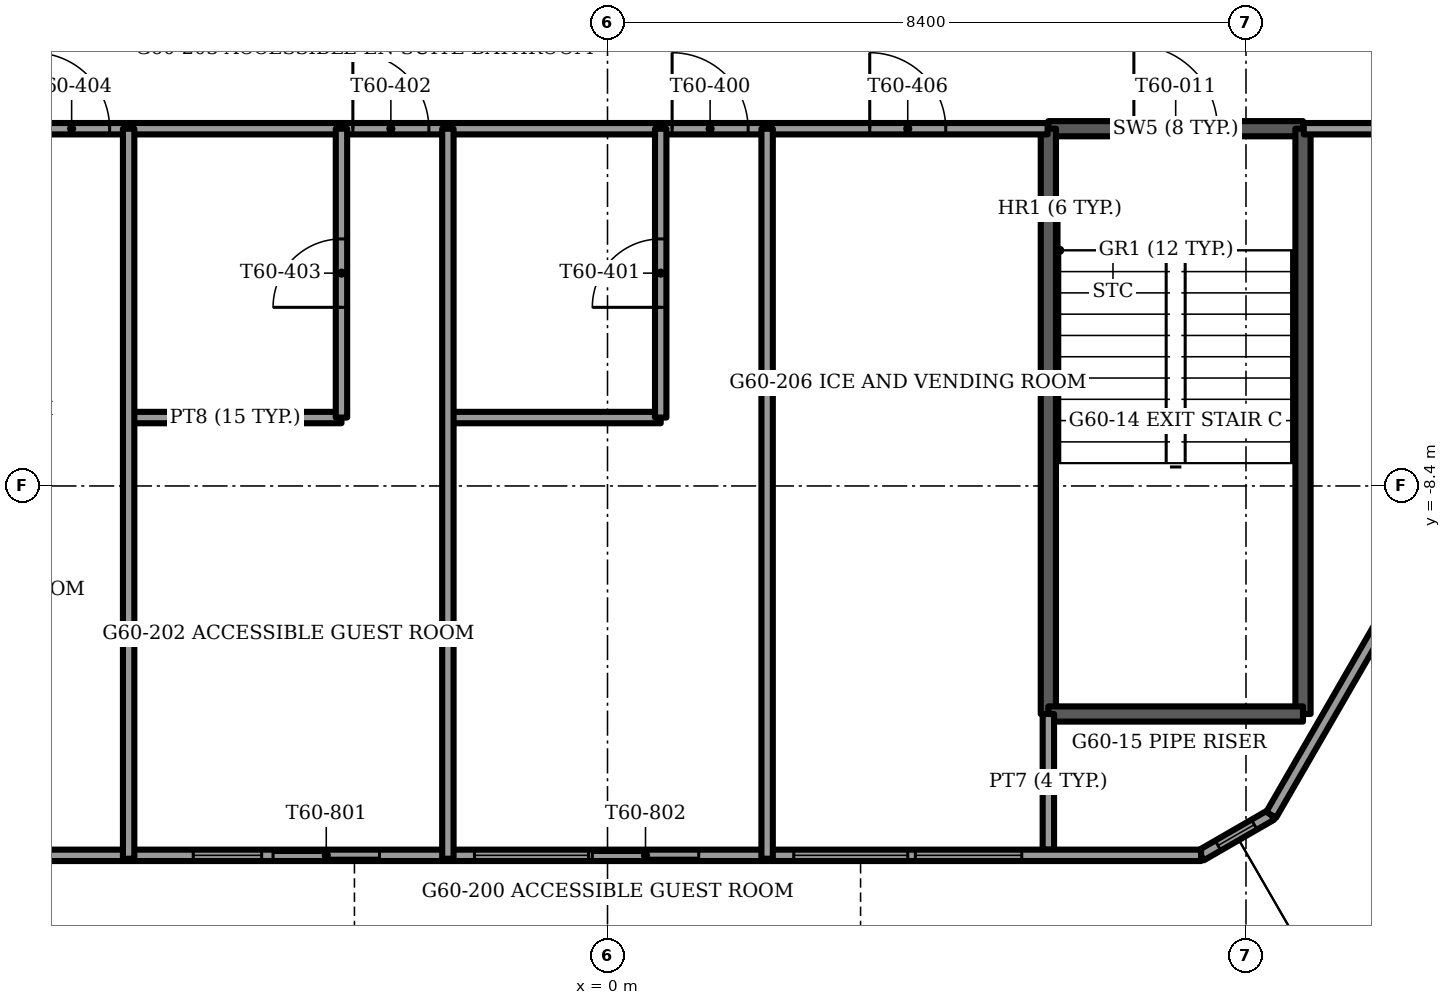
"""IFC4 building model, lengths in metres.
Left out: names, types, materials, properties, quantities, classifications, styles, units other than length and angle.
Written with IfcOpenShell. Run it as: python <this file> out.ifc"""

import sys

from ifc_helpers import new_model, si_unit, direction, frame, frame_2d, origin, place, context, subcontext, project, spatial, rectangle, extrude, element, fill, save


model = new_model("IFC4")
c1 = context("Model", 3, precision=1e-05, world=origin(), true_north=direction((0.0, 1.0)))
c2 = subcontext(c1, "Body", "Model", "MODEL_VIEW")
j1 = project(units=[si_unit("LENGTHUNIT", "METRE"), si_unit("PLANEANGLEUNIT", "RADIAN")], contexts=[c1])
p1 = place(None, origin())
s1 = spatial("IfcSite", under=j1, at=p1, CompositionType="ELEMENT")
p2 = place(p1, origin())
s2 = spatial("IfcBuilding", under=s1, at=p2, CompositionType="ELEMENT")
p3 = place(p2, frame((0.0, 0.0, 245.0)))
s3 = spatial("IfcBuildingStorey", under=s2, at=p3, CompositionType="ELEMENT", Elevation=245.0)
p4 = place(p3, frame((10.356, -15.762, 0.0), z_axis=(0.0, 0.0, 1.0), x_axis=(0.500002852929, 0.866023756639, 0.0)))
e1 = element("IfcWall", 1, at=p4, inside=s3, PredefinedType="PARAPET", context=c2, shape_type="SweptSolid", body=[
    extrude(rectangle(XDim=4.723, YDim=0.9, at=frame_2d((2.362, 0.0))), origin(), (0.0, 0.0, 1.0), 1.1),
])
p5 = place(p3, frame((-7.809, -13.26, 0.0), z_axis=(0.0, 0.0, 1.0), x_axis=(1.0, 0.0, 0.0)))
e2 = element("IfcWall", 2, at=p5, inside=s3, PredefinedType="SOLIDWALL", context=c2, shape_type="SweptSolid", body=[
    extrude(rectangle(XDim=15.618, YDim=0.15, at=frame_2d((7.809, 0.0))), origin(), (0.0, 0.0, 1.0), 3.45),
])
p6 = place(p5, frame((2.359, 0.0, 0.15)))
e3 = element("IfcOpeningElement", 3, at=p6, cuts=e2, PredefinedType="OPENING", context=c2, shape_type="SweptSolid", body=[
    extrude(rectangle(XDim=0.9, YDim=2.85, at=frame_2d((0.45, 1.425))), frame((0.0, 0.075, 0.0), z_axis=(0.0, -1.0, 0.0), x_axis=(1.0, 0.0, 0.0)), (0.0, 0.0, 1.0), 0.15),
])
p7 = place(p5, frame((3.409, 0.0, 0.0)))
e4 = element("IfcOpeningElement", 4, at=p7, cuts=e2, PredefinedType="OPENING", context=c2, shape_type="SweptSolid", body=[
    extrude(rectangle(XDim=1.4, YDim=2.4, at=frame_2d((0.7, 1.2))), frame((0.0, 0.075, 0.0), z_axis=(0.0, -1.0, 0.0), x_axis=(1.0, 0.0, 0.0)), (0.0, 0.0, 1.0), 0.15),
])
p8 = place(p5, frame((6.059, 0.0, 0.15)))
e5 = element("IfcOpeningElement", 5, at=p8, cuts=e2, PredefinedType="OPENING", context=c2, shape_type="SweptSolid", body=[
    extrude(rectangle(XDim=1.5, YDim=2.85, at=frame_2d((0.75, 1.425))), frame((0.0, 0.075, 0.0), z_axis=(0.0, -1.0, 0.0), x_axis=(1.0, 0.0, 0.0)), (0.0, 0.0, 1.0), 0.15),
])
p9 = place(p5, frame((7.609, 0.0, 0.0)))
e6 = element("IfcOpeningElement", 6, at=p9, cuts=e2, PredefinedType="OPENING", context=c2, shape_type="SweptSolid", body=[
    extrude(rectangle(XDim=1.4, YDim=2.4, at=frame_2d((0.7, 1.2))), frame((0.0, 0.075, 0.0), z_axis=(0.0, -1.0, 0.0), x_axis=(1.0, 0.0, 0.0)), (0.0, 0.0, 1.0), 0.15),
])
p10 = place(p5, frame((10.259, 0.0, 0.15)))
e7 = element("IfcOpeningElement", 7, at=p10, cuts=e2, PredefinedType="OPENING", context=c2, shape_type="SweptSolid", body=[
    extrude(rectangle(XDim=1.5, YDim=2.85, at=frame_2d((0.75, 1.425))), frame((0.0, 0.075, 0.0), z_axis=(0.0, -1.0, 0.0), x_axis=(1.0, 0.0, 0.0)), (0.0, 0.0, 1.0), 0.15),
])
p11 = place(p5, frame((11.859, 0.0, 0.15)))
e8 = element("IfcOpeningElement", 8, at=p11, cuts=e2, PredefinedType="OPENING", context=c2, shape_type="SweptSolid", body=[
    extrude(rectangle(XDim=1.4, YDim=2.85, at=frame_2d((0.7, 1.425))), frame((0.0, 0.075, 0.0), z_axis=(0.0, -1.0, 0.0), x_axis=(1.0, 0.0, 0.0)), (0.0, 0.0, 1.0), 0.15),
])
p12 = place(p3, frame((8.731, -12.727, 0.0), z_axis=(0.0, 0.0, 1.0), x_axis=(0.499997087355, 0.866027085394, 0.0)))
e9 = element("IfcWall", 9, at=p12, inside=s3, PredefinedType="SOLIDWALL", context=c2, shape_type="SweptSolid", body=[
    extrude(rectangle(XDim=13.312, YDim=0.15, at=frame_2d((6.656, 0.0))), origin(), (0.0, 0.0, 1.0), 3.45),
])
p13 = place(p12, frame((2.756, 0.0, 0.15)))
e10 = element("IfcOpeningElement", 10, at=p13, cuts=e9, PredefinedType="OPENING", context=c2, shape_type="SweptSolid", body=[
    extrude(rectangle(XDim=1.5, YDim=2.85, at=frame_2d((0.75, 1.425))), frame((0.0, 0.075, 0.0), z_axis=(0.0, -1.0, 0.0), x_axis=(1.0, 0.0, 0.0)), (0.0, 0.0, 1.0), 0.15),
])
p14 = place(p12, frame((4.956, 0.0, 0.0)))
e11 = element("IfcOpeningElement", 11, at=p14, cuts=e9, PredefinedType="OPENING", context=c2, shape_type="SweptSolid", body=[
    extrude(rectangle(XDim=1.4, YDim=2.4, at=frame_2d((0.7, 1.2))), frame((0.0, 0.075, 0.0), z_axis=(0.0, -1.0, 0.0), x_axis=(1.0, 0.0, 0.0)), (0.0, 0.0, 1.0), 0.15),
])
p15 = place(p12, frame((6.956, 0.0, 0.15)))
e12 = element("IfcOpeningElement", 12, at=p15, cuts=e9, PredefinedType="OPENING", context=c2, shape_type="SweptSolid", body=[
    extrude(rectangle(XDim=0.9, YDim=2.85, at=frame_2d((0.45, 1.425))), frame((0.0, 0.075, 0.0), z_axis=(0.0, -1.0, 0.0), x_axis=(1.0, 0.0, 0.0)), (0.0, 0.0, 1.0), 0.15),
])
p16 = place(p12, frame((8.149, 0.0, 0.0)))
e13 = element("IfcOpeningElement", 13, at=p16, cuts=e9, PredefinedType="OPENING", context=c2, shape_type="SweptSolid", body=[
    extrude(rectangle(XDim=1.4, YDim=2.4, at=frame_2d((0.7, 1.2))), frame((0.0, 0.075, 0.0), z_axis=(0.0, -1.0, 0.0), x_axis=(1.0, 0.0, 0.0)), (0.0, 0.0, 1.0), 0.15),
])
p17 = place(p12, frame((11.385, 0.0, 0.15)))
e14 = element("IfcOpeningElement", 14, at=p17, cuts=e9, PredefinedType="OPENING", context=c2, shape_type="SweptSolid", body=[
    extrude(rectangle(XDim=1.5, YDim=2.73, at=frame_2d((0.75, 1.365))), frame((0.0, 0.075, 0.0), z_axis=(0.0, -1.0, 0.0), x_axis=(1.0, 0.0, 0.0)), (0.0, 0.0, 1.0), 0.15),
])
p18 = place(p3, frame((7.809, -13.26, 0.0), z_axis=(0.0, 0.0, 1.0), x_axis=(0.865990848561, 0.500059846627, 0.0)))
e15 = element("IfcWall", 15, at=p18, inside=s3, PredefinedType="SOLIDWALL", context=c2, shape_type="SweptSolid", body=[
    extrude(rectangle(XDim=1.065, YDim=0.15, at=frame_2d((0.532, 0.0))), origin(), (0.0, 0.0, 1.0), 3.45),
])
p19 = place(p18, frame((0.258, 0.0, 0.15)))
e16 = element("IfcOpeningElement", 16, at=p19, cuts=e15, PredefinedType="OPENING", context=c2, shape_type="SweptSolid", body=[
    extrude(rectangle(XDim=0.55, YDim=2.85, at=frame_2d((0.275, 1.425))), frame((0.0, 0.075, 0.0), z_axis=(0.0, -1.0, 0.0), x_axis=(1.0, 0.0, 0.0)), (0.0, 0.0, 1.0), 0.15),
])
p20 = place(p3, frame((5.8, -3.7, -0.3), z_axis=(0.0, 0.0, 1.0), x_axis=(1.0, 0.0, 0.0)))
e17 = element("IfcWall", 17, at=p20, inside=s3, PredefinedType="SOLIDWALL", context=c2, shape_type="SweptSolid", body=[
    extrude(rectangle(XDim=3.35, YDim=0.2, at=frame_2d((1.675, 0.0))), origin(), (0.0, 0.0, 1.0), 3.75),
])
p21 = place(p20, frame((1.125, 0.0, 0.0)))
e18 = element("IfcOpeningElement", 18, at=p21, cuts=e17, PredefinedType="OPENING", context=c2, shape_type="SweptSolid", body=[
    extrude(rectangle(XDim=1.1, YDim=2.1, at=frame_2d((0.55, 1.05))), frame((0.0, 0.1, 0.0), z_axis=(0.0, -1.0, 0.0), x_axis=(1.0, 0.0, 0.0)), (0.0, 0.0, 1.0), 0.2),
])
for number, where, z_axis, x_axis in (
    (19, (5.8, -3.7, -0.3), (0.0, 0.0, 1.0), (0.0, -1.0, 0.0)),
    (20, (9.15, -3.7, -0.3), (0.0, 0.0, 1.0), (0.0, -1.0, 0.0)),
):
    element("IfcWall", number, at=place(p3, frame(where, z_axis=z_axis, x_axis=x_axis)), inside=s3, PredefinedType="SOLIDWALL", context=c2, shape_type="SweptSolid", body=[
        extrude(rectangle(XDim=7.7, YDim=0.2, at=frame_2d((3.85, 0.0))), origin(), (0.0, 0.0, 1.0), 3.75),
    ])
p22 = place(p3, frame((5.8, -11.4, -0.3), z_axis=(0.0, 0.0, 1.0), x_axis=(1.0, 0.0, 0.0)))
e21 = element("IfcWall", 21, at=p22, inside=s3, PredefinedType="SOLIDWALL", context=c2, shape_type="SweptSolid", body=[
    extrude(rectangle(XDim=3.35, YDim=0.2, at=frame_2d((1.675, 0.0))), origin(), (0.0, 0.0, 1.0), 3.75),
])
p23 = place(p3, frame((5.8, -11.4, 0.0), z_axis=(0.0, 0.0, 1.0), x_axis=(0.0, -1.0, 0.0)))
e22 = element("IfcWall", 22, at=p23, inside=s3, PredefinedType="PARTITIONING", context=c2, shape_type="SweptSolid", body=[
    extrude(rectangle(XDim=1.785, YDim=0.15, at=frame_2d((0.892, 0.0))), origin(), (0.0, 0.0, 1.0), 3.45),
])
for number, where, z_axis, x_axis in (
    (23, (-6.3, -7.5, 0.0), (0.0, 0.0, 1.0), (1.0, 0.0, 0.0)),
    (24, (-2.1, -7.5, 0.0), (0.0, 0.0, 1.0), (1.0, 0.0, 0.0)),
):
    element("IfcWall", number, at=place(p3, frame(where, z_axis=z_axis, x_axis=x_axis)), inside=s3, PredefinedType="PARTITIONING", context=c2, shape_type="SweptSolid", body=[
        extrude(rectangle(XDim=2.8, YDim=0.15, at=frame_2d((1.4, 0.0))), origin(), (0.0, 0.0, 1.0), 3.45),
    ])
p24 = place(p3, frame((-13.995, -3.7, 0.0), z_axis=(0.0, 0.0, 1.0), x_axis=(1.0, 0.0, 0.0)))
e25 = element("IfcWall", 25, at=p24, inside=s3, PredefinedType="PARTITIONING", context=c2, shape_type="SweptSolid", body=[
    extrude(rectangle(XDim=19.785, YDim=0.15, at=frame_2d((9.893, 0.0))), origin(), (0.0, 0.0, 1.0), 3.45),
])
p25 = place(p24, frame((14.845, 0.0, 0.0)))
e26 = element("IfcOpeningElement", 26, at=p25, cuts=e25, PredefinedType="OPENING", context=c2, shape_type="SweptSolid", body=[
    extrude(rectangle(XDim=1.0, YDim=2.1, at=frame_2d((0.5, 1.05))), frame((0.0, 0.075, 0.0), z_axis=(0.0, -1.0, 0.0), x_axis=(1.0, 0.0, 0.0)), (0.0, 0.0, 1.0), 0.15),
])
p26 = place(p24, frame((10.645, 0.0, 0.0)))
e27 = element("IfcOpeningElement", 27, at=p26, cuts=e25, PredefinedType="OPENING", context=c2, shape_type="SweptSolid", body=[
    extrude(rectangle(XDim=1.0, YDim=2.1, at=frame_2d((0.5, 1.05))), frame((0.0, 0.075, 0.0), z_axis=(0.0, -1.0, 0.0), x_axis=(1.0, 0.0, 0.0)), (0.0, 0.0, 1.0), 0.15),
])
p27 = place(p24, frame((6.445, 0.0, 0.0)))
e28 = element("IfcOpeningElement", 28, at=p27, cuts=e25, PredefinedType="OPENING", context=c2, shape_type="SweptSolid", body=[
    extrude(rectangle(XDim=1.0, YDim=2.1, at=frame_2d((0.5, 1.05))), frame((0.0, 0.075, 0.0), z_axis=(0.0, -1.0, 0.0), x_axis=(1.0, 0.0, 0.0)), (0.0, 0.0, 1.0), 0.15),
])
p28 = place(p24, frame((17.445, 0.0, 0.0)))
e29 = element("IfcOpeningElement", 29, at=p28, cuts=e25, PredefinedType="OPENING", context=c2, shape_type="SweptSolid", body=[
    extrude(rectangle(XDim=1.0, YDim=2.1, at=frame_2d((0.5, 1.05))), frame((0.0, 0.075, 0.0), z_axis=(0.0, -1.0, 0.0), x_axis=(1.0, 0.0, 0.0)), (0.0, 0.0, 1.0), 0.15),
])
p29 = place(p3, frame((9.16, -3.7, 0.0), z_axis=(0.0, 0.0, 1.0), x_axis=(1.0, 0.0, 0.0)))
e30 = element("IfcWall", 30, at=p29, inside=s3, PredefinedType="PARTITIONING", context=c2, shape_type="SweptSolid", body=[
    extrude(rectangle(XDim=4.835, YDim=0.15, at=frame_2d((2.417, 0.0))), origin(), (0.0, 0.0, 1.0), 3.45),
])
p30 = place(p3, frame((2.1, -13.304, 0.0), z_axis=(0.0, 0.0, 1.0), x_axis=(0.0, 1.0, 0.0)))
e31 = element("IfcWall", 31, at=p30, inside=s3, PredefinedType="PARTITIONING", context=c2, shape_type="SweptSolid", body=[
    extrude(rectangle(XDim=9.604, YDim=0.15, at=frame_2d((4.802, 0.0))), origin(), (0.0, 0.0, 1.0), 3.45),
])
p31 = place(p3, frame((0.7, -7.5, 0.0), z_axis=(0.0, 0.0, 1.0), x_axis=(0.0, 1.0, 0.0)))
e32 = element("IfcWall", 32, at=p31, inside=s3, PredefinedType="PARTITIONING", context=c2, shape_type="SweptSolid", body=[
    extrude(rectangle(XDim=3.8, YDim=0.15, at=frame_2d((1.9, 0.0))), origin(), (0.0, 0.0, 1.0), 3.45),
])
p32 = place(p31, frame((1.45, 0.0, 0.0)))
e33 = element("IfcOpeningElement", 33, at=p32, cuts=e32, PredefinedType="OPENING", context=c2, shape_type="SweptSolid", body=[
    extrude(rectangle(XDim=0.9, YDim=2.1, at=frame_2d((0.45, 1.05))), frame((0.0, 0.075, 0.0), z_axis=(0.0, -1.0, 0.0), x_axis=(1.0, 0.0, 0.0)), (0.0, 0.0, 1.0), 0.15),
])
p33 = place(p3, frame((-2.1, -13.304, 0.0), z_axis=(0.0, 0.0, 1.0), x_axis=(0.0, 1.0, 0.0)))
e34 = element("IfcWall", 34, at=p33, inside=s3, PredefinedType="PARTITIONING", context=c2, shape_type="SweptSolid", body=[
    extrude(rectangle(XDim=9.604, YDim=0.15, at=frame_2d((4.802, 0.0))), origin(), (0.0, 0.0, 1.0), 3.45),
])
p34 = place(p3, frame((-3.5, -7.5, 0.0), z_axis=(0.0, 0.0, 1.0), x_axis=(0.0, 1.0, 0.0)))
e35 = element("IfcWall", 35, at=p34, inside=s3, PredefinedType="PARTITIONING", context=c2, shape_type="SweptSolid", body=[
    extrude(rectangle(XDim=3.8, YDim=0.15, at=frame_2d((1.9, 0.0))), origin(), (0.0, 0.0, 1.0), 3.45),
])
p35 = place(p34, frame((1.45, 0.0, 0.0)))
e36 = element("IfcOpeningElement", 36, at=p35, cuts=e35, PredefinedType="OPENING", context=c2, shape_type="SweptSolid", body=[
    extrude(rectangle(XDim=0.9, YDim=2.1, at=frame_2d((0.45, 1.05))), frame((0.0, 0.075, 0.0), z_axis=(0.0, -1.0, 0.0), x_axis=(1.0, 0.0, 0.0)), (0.0, 0.0, 1.0), 0.15),
])
p36 = place(p3, frame((-6.3, -13.304, 0.0), z_axis=(0.0, 0.0, 1.0), x_axis=(0.0, 1.0, 0.0)))
e37 = element("IfcWall", 37, at=p36, inside=s3, PredefinedType="PARTITIONING", context=c2, shape_type="SweptSolid", body=[
    extrude(rectangle(XDim=9.604, YDim=0.15, at=frame_2d((4.802, 0.0))), origin(), (0.0, 0.0, 1.0), 3.45),
])
p37 = place(p6, origin())
e38 = element("IfcWindow", 38, at=p37, inside=s3, PartitioningType="SINGLE_PANEL", PredefinedType="WINDOW", context=c2, shape_type="SweptSolid", body=[
    extrude(rectangle(XDim=0.9, YDim=2.85, at=frame_2d((0.45, 1.425))), frame((0.0, 0.03, 0.0), z_axis=(0.0, -1.0, 0.0), x_axis=(1.0, 0.0, 0.0)), (0.0, 0.0, 1.0), 0.06),
])
fill(e3, e38)
p38 = place(p7, origin())
e39 = element("IfcDoor", 39, at=p38, inside=s3, OperationType="SLIDING_TO_LEFT", PredefinedType="DOOR", context=c2, shape_type="SweptSolid", body=[
    extrude(rectangle(XDim=1.4, YDim=2.4, at=frame_2d((0.7, 1.2))), frame((0.0, 0.025, 0.0), z_axis=(0.0, -1.0, 0.0), x_axis=(1.0, 0.0, 0.0)), (0.0, 0.0, 1.0), 0.05),
])
fill(e4, e39)
p39 = place(p8, origin())
e40 = element("IfcWindow", 40, at=p39, inside=s3, PartitioningType="SINGLE_PANEL", PredefinedType="WINDOW", context=c2, shape_type="SweptSolid", body=[
    extrude(rectangle(XDim=1.5, YDim=2.85, at=frame_2d((0.75, 1.425))), frame((0.0, 0.03, 0.0), z_axis=(0.0, -1.0, 0.0), x_axis=(1.0, 0.0, 0.0)), (0.0, 0.0, 1.0), 0.06),
])
fill(e5, e40)
p40 = place(p9, origin())
e41 = element("IfcDoor", 41, at=p40, inside=s3, OperationType="SLIDING_TO_RIGHT", PredefinedType="DOOR", context=c2, shape_type="SweptSolid", body=[
    extrude(rectangle(XDim=1.4, YDim=2.4, at=frame_2d((0.7, 1.2))), frame((0.0, 0.025, 0.0), z_axis=(0.0, -1.0, 0.0), x_axis=(1.0, 0.0, 0.0)), (0.0, 0.0, 1.0), 0.05),
])
fill(e6, e41)
p41 = place(p10, origin())
e42 = element("IfcWindow", 42, at=p41, inside=s3, PartitioningType="SINGLE_PANEL", PredefinedType="WINDOW", context=c2, shape_type="SweptSolid", body=[
    extrude(rectangle(XDim=1.5, YDim=2.85, at=frame_2d((0.75, 1.425))), frame((0.0, 0.03, 0.0), z_axis=(0.0, -1.0, 0.0), x_axis=(1.0, 0.0, 0.0)), (0.0, 0.0, 1.0), 0.06),
])
fill(e7, e42)
p42 = place(p11, origin())
e43 = element("IfcWindow", 43, at=p42, inside=s3, PartitioningType="SINGLE_PANEL", PredefinedType="WINDOW", context=c2, shape_type="SweptSolid", body=[
    extrude(rectangle(XDim=1.4, YDim=2.85, at=frame_2d((0.7, 1.425))), frame((0.0, 0.03, 0.0), z_axis=(0.0, -1.0, 0.0), x_axis=(1.0, 0.0, 0.0)), (0.0, 0.0, 1.0), 0.06),
])
fill(e8, e43)
p43 = place(p19, origin())
e44 = element("IfcWindow", 44, at=p43, inside=s3, PartitioningType="SINGLE_PANEL", PredefinedType="WINDOW", context=c2, shape_type="SweptSolid", body=[
    extrude(rectangle(XDim=0.55, YDim=2.85, at=frame_2d((0.275, 1.425))), frame((0.0, 0.03, 0.0), z_axis=(0.0, -1.0, 0.0), x_axis=(1.0, 0.0, 0.0)), (0.0, 0.0, 1.0), 0.06),
])
fill(e16, e44)
p44 = place(p21, origin())
e45 = element("IfcDoor", 45, at=p44, inside=s3, OperationType="SINGLE_SWING_LEFT", PredefinedType="DOOR", context=c2, shape_type="SweptSolid", body=[
    extrude(rectangle(XDim=1.1, YDim=2.1, at=frame_2d((0.55, 1.05))), frame((0.0, 0.025, 0.0), z_axis=(0.0, -1.0, 0.0), x_axis=(1.0, 0.0, 0.0)), (0.0, 0.0, 1.0), 0.05),
])
fill(e18, e45)
p45 = place(p25, origin())
e46 = element("IfcDoor", 46, at=p45, inside=s3, OperationType="SINGLE_SWING_RIGHT", PredefinedType="DOOR", context=c2, shape_type="SweptSolid", body=[
    extrude(rectangle(XDim=1.0, YDim=2.1, at=frame_2d((0.5, 1.05))), frame((0.0, 0.025, 0.0), z_axis=(0.0, -1.0, 0.0), x_axis=(1.0, 0.0, 0.0)), (0.0, 0.0, 1.0), 0.05),
])
fill(e26, e46)
p46 = place(p32, origin())
e47 = element("IfcDoor", 47, at=p46, inside=s3, OperationType="SINGLE_SWING_RIGHT", PredefinedType="DOOR", context=c2, shape_type="SweptSolid", body=[
    extrude(rectangle(XDim=0.9, YDim=2.1, at=frame_2d((0.45, 1.05))), frame((0.0, 0.025, 0.0), z_axis=(0.0, -1.0, 0.0), x_axis=(1.0, 0.0, 0.0)), (0.0, 0.0, 1.0), 0.05),
])
fill(e33, e47)
p47 = place(p26, origin())
e48 = element("IfcDoor", 48, at=p47, inside=s3, OperationType="SINGLE_SWING_RIGHT", PredefinedType="DOOR", context=c2, shape_type="SweptSolid", body=[
    extrude(rectangle(XDim=1.0, YDim=2.1, at=frame_2d((0.5, 1.05))), frame((0.0, 0.025, 0.0), z_axis=(0.0, -1.0, 0.0), x_axis=(1.0, 0.0, 0.0)), (0.0, 0.0, 1.0), 0.05),
])
fill(e27, e48)
p48 = place(p35, origin())
e49 = element("IfcDoor", 49, at=p48, inside=s3, OperationType="SINGLE_SWING_RIGHT", PredefinedType="DOOR", context=c2, shape_type="SweptSolid", body=[
    extrude(rectangle(XDim=0.9, YDim=2.1, at=frame_2d((0.45, 1.05))), frame((0.0, 0.025, 0.0), z_axis=(0.0, -1.0, 0.0), x_axis=(1.0, 0.0, 0.0)), (0.0, 0.0, 1.0), 0.05),
])
fill(e36, e49)
p49 = place(p27, origin())
e50 = element("IfcDoor", 50, at=p49, inside=s3, OperationType="SINGLE_SWING_RIGHT", PredefinedType="DOOR", context=c2, shape_type="SweptSolid", body=[
    extrude(rectangle(XDim=1.0, YDim=2.1, at=frame_2d((0.5, 1.05))), frame((0.0, 0.025, 0.0), z_axis=(0.0, -1.0, 0.0), x_axis=(1.0, 0.0, 0.0)), (0.0, 0.0, 1.0), 0.05),
])
fill(e28, e50)
p50 = place(p28, origin())
e51 = element("IfcDoor", 51, at=p50, inside=s3, OperationType="SINGLE_SWING_LEFT", PredefinedType="DOOR", context=c2, shape_type="SweptSolid", body=[
    extrude(rectangle(XDim=1.0, YDim=2.1, at=frame_2d((0.5, 1.05))), frame((0.0, 0.025, 0.0), z_axis=(0.0, -1.0, 0.0), x_axis=(1.0, 0.0, 0.0)), (0.0, 0.0, 1.0), 0.05),
])
fill(e29, e51)
save(model, sys.argv[1])
